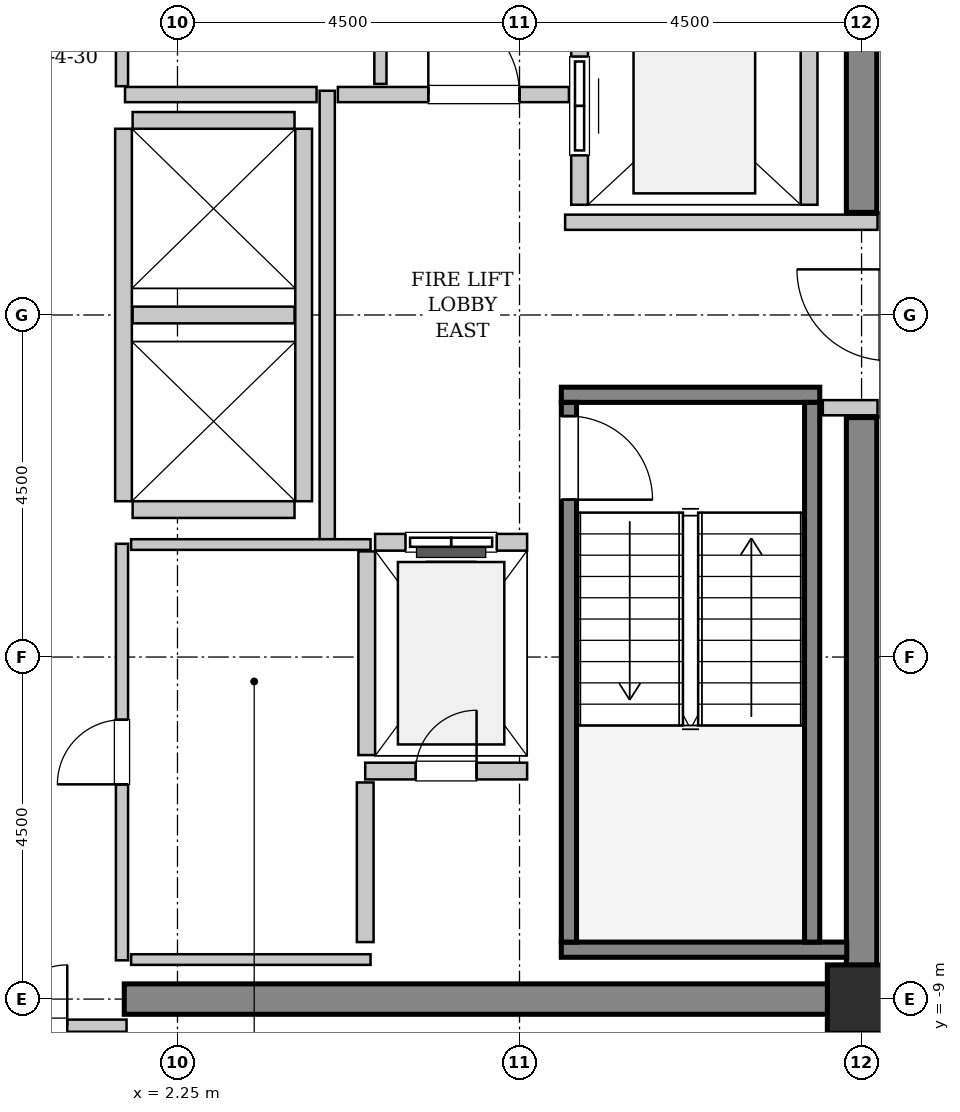
"""IFC4 building model, lengths in metres.
Left out: names, types, materials, properties, quantities, classifications, styles, units other than length and angle.
Written with IfcOpenShell. Run it as: python <this file> out.ifc"""

import sys

from ifc_helpers import new_model, si_unit, direction, frame, frame_2d, origin, origin_2d, place, context, subcontext, project, spatial, rectangle, extrude, source, transform, mapped, element, fill, save


model = new_model("IFC4")
c1 = context("Model", 3, precision=1e-05, world=origin(), true_north=direction((0.0, 1.0)))
c2 = subcontext(c1, "Body", "Model", "MODEL_VIEW")
j1 = project(units=[si_unit("LENGTHUNIT", "METRE"), si_unit("PLANEANGLEUNIT", "RADIAN")], contexts=[c1])
p1 = place(None, origin())
s1 = spatial("IfcSite", under=j1, at=p1, CompositionType="ELEMENT")
p2 = place(p1, origin())
s2 = spatial("IfcBuilding", under=s1, at=p2, CompositionType="ELEMENT")
p3 = place(p2, frame((0.0, 0.0, 337.6)))
s3 = spatial("IfcBuildingStorey", under=s2, at=p3, CompositionType="ELEMENT", Elevation=337.6)
m1 = source(origin(), c2, "Body", "SweptSolid", [
    extrude(rectangle(XDim=9.9, YDim=0.4, at=frame_2d((4.95, 0.0))), origin(), (0.0, 0.0, 1.0), 3.8),
])
p4 = place(p3, frame((1.55, -9.0, 0.0), z_axis=(0.0, 0.0, 1.0), x_axis=(1.0, 0.0, 0.0)))
e1 = element("IfcWall", 1, at=p4, inside=s3, PredefinedType="SHEAR", context=c2, shape_type="MappedRepresentation", body=[
    mapped(m1, transform((0.0, 0.0, 0.0), x_axis=(1.0, 0.0, 0.0), y_axis=(0.0, 1.0, 0.0), z_axis=(0.0, 0.0, 1.0), scale=1.0)),
])
m2 = source(origin(), c2, "Body", "SweptSolid", [
    extrude(rectangle(XDim=7.45, YDim=0.4, at=frame_2d((3.725, 0.0))), origin(), (0.0, 0.0, 1.0), 3.8),
])
for number, where, z_axis, x_axis in (
    (2, (11.25, -8.8, 0.0), (0.0, 0.0, 1.0), (0.0, 1.0, 0.0)),
    (3, (11.25, 1.35, 0.0), (0.0, 0.0, 1.0), (0.0, 1.0, 0.0)),
):
    element("IfcWall", number, at=place(p3, frame(where, z_axis=z_axis, x_axis=x_axis)), inside=s3, PredefinedType="SHEAR", context=c2, shape_type="MappedRepresentation", body=[
        mapped(m2, transform((0.0, 0.0, 0.0), x_axis=(1.0, 0.0, 0.0), y_axis=(0.0, 1.0, 0.0), z_axis=(0.0, 0.0, 1.0), scale=1.0)),
    ])
m3 = source(origin(), c2, "Body", "SweptSolid", [
    extrude(rectangle(XDim=0.9, YDim=0.9, at=origin_2d()), origin(), (0.0, 0.0, 1.0), 3.8),
])
p5 = place(p3, frame((11.25, -9.0, 0.0), z_axis=(0.0, 0.0, 1.0), x_axis=(1.0, 0.0, 0.0)))
e4 = element("IfcColumn", 4, at=p5, inside=s3, PredefinedType="COLUMN", context=c2, shape_type="MappedRepresentation", body=[
    mapped(m3, transform((0.0, 0.0, 0.0), x_axis=(1.0, 0.0, 0.0), y_axis=(0.0, 1.0, 0.0), z_axis=(0.0, 0.0, 1.0), scale=1.0)),
])
m4 = source(origin(), c2, "Body", "SweptSolid", [
    extrude(rectangle(XDim=3.4, YDim=0.2, at=frame_2d((1.7, 0.0))), origin(), (0.0, 0.0, 1.0), 3.8),
])
p6 = place(p3, frame((7.3, -1.05, 0.0), z_axis=(0.0, 0.0, 1.0), x_axis=(1.0, 0.0, 0.0)))
e5 = element("IfcWall", 5, at=p6, inside=s3, PredefinedType="SOLIDWALL", context=c2, shape_type="MappedRepresentation", body=[
    mapped(m4, transform((0.0, 0.0, 0.0), x_axis=(1.0, 0.0, 0.0), y_axis=(0.0, 1.0, 0.0), z_axis=(0.0, 0.0, 1.0), scale=1.0)),
])
m5 = source(origin(), c2, "Body", "SweptSolid", [
    extrude(rectangle(XDim=3.755, YDim=0.2, at=frame_2d((1.877, 0.0))), origin(), (0.0, 0.0, 1.0), 3.8),
])
p7 = place(p3, frame((7.3, -8.35, 0.0), z_axis=(0.0, 0.0, 1.0), x_axis=(1.0, 0.0, 0.0)))
e6 = element("IfcWall", 6, at=p7, inside=s3, PredefinedType="SOLIDWALL", context=c2, shape_type="MappedRepresentation", body=[
    mapped(m5, transform((0.0, 0.0, 0.0), x_axis=(1.0, 0.0, 0.0), y_axis=(0.0, 1.0, 0.0), z_axis=(0.0, 0.0, 1.0), scale=1.0)),
])
m6 = source(origin(), c2, "Body", "SweptSolid", [
    extrude(rectangle(XDim=7.1, YDim=0.2, at=frame_2d((3.55, 0.0))), origin(), (0.0, 0.0, 1.0), 3.8),
])
p8 = place(p3, frame((7.4, -1.15, 0.0), z_axis=(0.0, 0.0, 1.0), x_axis=(0.0, -1.0, 0.0)))
e7 = element("IfcWall", 7, at=p8, inside=s3, PredefinedType="SOLIDWALL", context=c2, shape_type="MappedRepresentation", body=[
    mapped(m6, transform((0.0, 0.0, 0.0), x_axis=(1.0, 0.0, 0.0), y_axis=(0.0, 1.0, 0.0), z_axis=(0.0, 0.0, 1.0), scale=1.0)),
])
p9 = place(p8, frame((0.18, 0.0, 0.0)))
e8 = element("IfcOpeningElement", 8, at=p9, cuts=e7, PredefinedType="OPENING", context=c2, shape_type="SweptSolid", body=[
    extrude(rectangle(XDim=1.1, YDim=2.15, at=frame_2d((0.55, 1.075))), frame((0.0, 0.11, 0.0), z_axis=(0.0, -1.0, 0.0), x_axis=(1.0, 0.0, 0.0)), (0.0, 0.0, 1.0), 0.22),
])
p10 = place(p3, frame((10.6, -1.15, 0.0), z_axis=(0.0, 0.0, 1.0), x_axis=(0.0, -1.0, 0.0)))
e9 = element("IfcWall", 9, at=p10, inside=s3, PredefinedType="SOLIDWALL", context=c2, shape_type="MappedRepresentation", body=[
    mapped(m6, transform((0.0, 0.0, 0.0), x_axis=(1.0, 0.0, 0.0), y_axis=(0.0, 1.0, 0.0), z_axis=(0.0, 0.0, 1.0), scale=1.0)),
])
m7 = source(origin(), c2, "Body", "SweptSolid", [
    extrude(rectangle(XDim=2.0, YDim=0.22, at=frame_2d((1.0, 0.0))), origin(), (0.0, 0.0, 1.0), 3.535),
])
p11 = place(p3, frame((6.85, -2.99, 0.0), z_axis=(0.0, 0.0, 1.0), x_axis=(-1.0, 0.0, 0.0)))
e10 = element("IfcWall", 10, at=p11, inside=s3, PredefinedType="SOLIDWALL", context=c2, shape_type="MappedRepresentation", body=[
    mapped(m7, transform((0.0, 0.0, 0.0), x_axis=(1.0, 0.0, 0.0), y_axis=(0.0, 1.0, 0.0), z_axis=(0.0, 0.0, 1.0), scale=1.0)),
])
p12 = place(p11, frame((0.4, 0.0, 0.0)))
e11 = element("IfcOpeningElement", 11, at=p12, cuts=e10, PredefinedType="OPENING", context=c2, shape_type="SweptSolid", body=[
    extrude(rectangle(XDim=1.2, YDim=2.2, at=frame_2d((0.6, 1.1))), frame((0.0, 0.12, 0.0), z_axis=(0.0, -1.0, 0.0), x_axis=(1.0, 0.0, 0.0)), (0.0, 0.0, 1.0), 0.24),
])
m8 = source(origin(), c2, "Body", "SweptSolid", [
    extrude(rectangle(XDim=2.68, YDim=0.22, at=frame_2d((1.34, 0.0))), origin(), (0.0, 0.0, 1.0), 3.535),
])
p13 = place(p3, frame((4.74, -3.11, 0.0), z_axis=(0.0, 0.0, 1.0), x_axis=(0.0, -1.0, 0.0)))
e12 = element("IfcWall", 12, at=p13, inside=s3, PredefinedType="SOLIDWALL", context=c2, shape_type="MappedRepresentation", body=[
    mapped(m8, transform((0.0, 0.0, 0.0), x_axis=(1.0, 0.0, 0.0), y_axis=(0.0, 1.0, 0.0), z_axis=(0.0, 0.0, 1.0), scale=1.0)),
])
m9 = source(origin(), c2, "Body", "SweptSolid", [
    extrude(rectangle(XDim=5.45, YDim=0.22, at=frame_2d((2.725, 0.0))), origin(), (0.0, 0.0, 1.0), 3.535),
])
p14 = place(p3, frame((7.54, 6.9, 0.0), z_axis=(0.0, 0.0, 1.0), x_axis=(0.0, -1.0, 0.0)))
e13 = element("IfcWall", 13, at=p14, inside=s3, PredefinedType="SOLIDWALL", context=c2, shape_type="MappedRepresentation", body=[
    mapped(m9, transform((0.0, 0.0, 0.0), x_axis=(1.0, 0.0, 0.0), y_axis=(0.0, 1.0, 0.0), z_axis=(0.0, 0.0, 1.0), scale=1.0)),
])
p15 = place(p14, frame((3.5, 0.0, 0.0)))
e14 = element("IfcOpeningElement", 14, at=p15, cuts=e13, PredefinedType="OPENING", context=c2, shape_type="SweptSolid", body=[
    extrude(rectangle(XDim=1.3, YDim=2.3, at=frame_2d((0.65, 1.15))), frame((0.0, 0.12, 0.0), z_axis=(0.0, -1.0, 0.0), x_axis=(1.0, 0.0, 0.0)), (0.0, 0.0, 1.0), 0.24),
])
p16 = place(p14, frame((0.65, 0.0, 0.0)))
e15 = element("IfcOpeningElement", 15, at=p16, cuts=e13, PredefinedType="OPENING", context=c2, shape_type="SweptSolid", body=[
    extrude(rectangle(XDim=1.3, YDim=2.3, at=frame_2d((0.65, 1.15))), frame((0.0, 0.12, 0.0), z_axis=(0.0, -1.0, 0.0), x_axis=(1.0, 0.0, 0.0)), (0.0, 0.0, 1.0), 0.24),
])
p17 = place(p3, frame((10.56, 1.45, 0.0), z_axis=(0.0, 0.0, 1.0), x_axis=(0.0, 1.0, 0.0)))
e16 = element("IfcWall", 16, at=p17, inside=s3, PredefinedType="SOLIDWALL", context=c2, shape_type="MappedRepresentation", body=[
    mapped(m9, transform((0.0, 0.0, 0.0), x_axis=(1.0, 0.0, 0.0), y_axis=(0.0, 1.0, 0.0), z_axis=(0.0, 0.0, 1.0), scale=1.0)),
])
m10 = source(origin(), c2, "Body", "SweptSolid", [
    extrude(rectangle(XDim=4.9, YDim=0.22, at=frame_2d((2.45, 0.0))), origin(), (0.0, 0.0, 1.0), 3.535),
])
for number, where, z_axis, x_axis in (
    (17, (1.54, 2.45, 0.0), (0.0, 0.0, 1.0), (0.0, -1.0, 0.0)),
    (18, (3.91, -2.45, 0.0), (0.0, 0.0, 1.0), (0.0, 1.0, 0.0)),
):
    element("IfcWall", number, at=place(p3, frame(where, z_axis=z_axis, x_axis=x_axis)), inside=s3, PredefinedType="SOLIDWALL", context=c2, shape_type="MappedRepresentation", body=[
        mapped(m10, transform((0.0, 0.0, 0.0), x_axis=(1.0, 0.0, 0.0), y_axis=(0.0, 1.0, 0.0), z_axis=(0.0, 0.0, 1.0), scale=1.0)),
    ])
m11 = source(origin(), c2, "Body", "SweptSolid", [
    extrude(rectangle(XDim=2.13, YDim=0.22, at=frame_2d((1.065, 0.0))), origin(), (0.0, 0.0, 1.0), 3.535),
])
for number, where, z_axis, x_axis in (
    (19, (1.66, -2.56, 0.0), (0.0, 0.0, 1.0), (1.0, 0.0, 0.0)),
    (20, (1.66, 0.0, 0.0), (0.0, 0.0, 1.0), (1.0, 0.0, 0.0)),
    (21, (3.79, 2.56, 0.0), (0.0, 0.0, 1.0), (-1.0, 0.0, 0.0)),
):
    element("IfcWall", number, at=place(p3, frame(where, z_axis=z_axis, x_axis=x_axis)), inside=s3, PredefinedType="SOLIDWALL", context=c2, shape_type="MappedRepresentation", body=[
        mapped(m11, transform((0.0, 0.0, 0.0), x_axis=(1.0, 0.0, 0.0), y_axis=(0.0, 1.0, 0.0), z_axis=(0.0, 0.0, 1.0), scale=1.0)),
    ])
p18 = place(p3, frame((4.72, -6.0, 0.0), z_axis=(0.0, 0.0, 1.0), x_axis=(1.0, 0.0, 0.0)))
e22 = element("IfcWall", 22, at=p18, inside=s3, PredefinedType="SOLIDWALL", context=c2, shape_type="MappedRepresentation", body=[
    mapped(m11, transform((0.0, 0.0, 0.0), x_axis=(1.0, 0.0, 0.0), y_axis=(0.0, 1.0, 0.0), z_axis=(0.0, 0.0, 1.0), scale=1.0)),
])
p19 = place(p18, frame((0.665, 0.0, 0.0)))
e23 = element("IfcOpeningElement", 23, at=p19, cuts=e22, PredefinedType="OPENING", context=c2, shape_type="SweptSolid", body=[
    extrude(rectangle(XDim=0.8, YDim=2.0, at=frame_2d((0.4, 1.0))), frame((0.0, 0.12, 0.0), z_axis=(0.0, -1.0, 0.0), x_axis=(1.0, 0.0, 0.0)), (0.0, 0.0, 1.0), 0.24),
])
m12 = source(origin(), c2, "Body", "SweptSolid", [
    extrude(rectangle(XDim=2.1, YDim=0.22, at=frame_2d((1.05, 0.0))), origin(), (0.0, 0.0, 1.0), 3.535),
])
p20 = place(p3, frame((4.72, -8.25, 0.0), z_axis=(0.0, 0.0, 1.0), x_axis=(0.0, 1.0, 0.0)))
e24 = element("IfcWall", 24, at=p20, inside=s3, PredefinedType="SOLIDWALL", context=c2, shape_type="MappedRepresentation", body=[
    mapped(m12, transform((0.0, 0.0, 0.0), x_axis=(1.0, 0.0, 0.0), y_axis=(0.0, 1.0, 0.0), z_axis=(0.0, 0.0, 1.0), scale=1.0)),
])
m13 = source(origin(), c2, "Body", "SweptSolid", [
    extrude(rectangle(XDim=5.9, YDim=0.2, at=frame_2d((2.95, 0.0))), origin(), (0.0, 0.0, 1.0), 3.535),
])
p21 = place(p3, frame((4.22, -2.95, 0.0), z_axis=(0.0, 0.0, 1.0), x_axis=(0.0, 1.0, 0.0)))
e25 = element("IfcWall", 25, at=p21, inside=s3, PredefinedType="PARTITIONING", context=c2, shape_type="MappedRepresentation", body=[
    mapped(m13, transform((0.0, 0.0, 0.0), x_axis=(1.0, 0.0, 0.0), y_axis=(0.0, 1.0, 0.0), z_axis=(0.0, 0.0, 1.0), scale=1.0)),
])
m14 = source(origin(), c2, "Body", "SweptSolid", [
    extrude(rectangle(XDim=2.52, YDim=0.2, at=frame_2d((1.26, 0.0))), origin(), (0.0, 0.0, 1.0), 3.535),
])
p22 = place(p3, frame((1.56, 2.9, 0.0), z_axis=(0.0, 0.0, 1.0), x_axis=(1.0, 0.0, 0.0)))
e26 = element("IfcWall", 26, at=p22, inside=s3, PredefinedType="PARTITIONING", context=c2, shape_type="MappedRepresentation", body=[
    mapped(m14, transform((0.0, 0.0, 0.0), x_axis=(1.0, 0.0, 0.0), y_axis=(0.0, 1.0, 0.0), z_axis=(0.0, 0.0, 1.0), scale=1.0)),
])
m15 = source(origin(), c2, "Body", "SweptSolid", [
    extrude(rectangle(XDim=3.04, YDim=0.2, at=frame_2d((1.52, 0.0))), origin(), (0.0, 0.0, 1.0), 3.535),
])
p23 = place(p3, frame((4.36, 2.9, 0.0), z_axis=(0.0, 0.0, 1.0), x_axis=(1.0, 0.0, 0.0)))
e27 = element("IfcWall", 27, at=p23, inside=s3, PredefinedType="PARTITIONING", context=c2, shape_type="MappedRepresentation", body=[
    mapped(m15, transform((0.0, 0.0, 0.0), x_axis=(1.0, 0.0, 0.0), y_axis=(0.0, 1.0, 0.0), z_axis=(0.0, 0.0, 1.0), scale=1.0)),
])
p24 = place(p23, frame((1.19, 0.0, 0.0)))
e28 = element("IfcOpeningElement", 28, at=p24, cuts=e27, PredefinedType="OPENING", context=c2, shape_type="SweptSolid", body=[
    extrude(rectangle(XDim=1.2, YDim=2.15, at=frame_2d((0.6, 1.075))), frame((0.0, 0.11, 0.0), z_axis=(0.0, -1.0, 0.0), x_axis=(1.0, 0.0, 0.0)), (0.0, 0.0, 1.0), 0.22),
])
m16 = source(origin(), c2, "Body", "SweptSolid", [
    extrude(rectangle(XDim=4.11, YDim=0.2, at=frame_2d((2.055, 0.0))), origin(), (0.0, 0.0, 1.0), 3.535),
])
p25 = place(p3, frame((7.35, 1.22, 0.0), z_axis=(0.0, 0.0, 1.0), x_axis=(1.0, 0.0, 0.0)))
e29 = element("IfcWall", 29, at=p25, inside=s3, PredefinedType="PARTITIONING", context=c2, shape_type="MappedRepresentation", body=[
    mapped(m16, transform((0.0, 0.0, 0.0), x_axis=(1.0, 0.0, 0.0), y_axis=(0.0, 1.0, 0.0), z_axis=(0.0, 0.0, 1.0), scale=1.0)),
])
m17 = source(origin(), c2, "Body", "SweptSolid", [
    extrude(rectangle(XDim=0.72, YDim=0.2, at=frame_2d((0.36, 0.0))), origin(), (0.0, 0.0, 1.0), 3.535),
])
p26 = place(p3, frame((10.74, -1.22, 0.0), z_axis=(0.0, 0.0, 1.0), x_axis=(1.0, 0.0, 0.0)))
e30 = element("IfcWall", 30, at=p26, inside=s3, PredefinedType="PARTITIONING", context=c2, shape_type="MappedRepresentation", body=[
    mapped(m17, transform((0.0, 0.0, 0.0), x_axis=(1.0, 0.0, 0.0), y_axis=(0.0, 1.0, 0.0), z_axis=(0.0, 0.0, 1.0), scale=1.0)),
])
m18 = source(origin(), c2, "Body", "SweptSolid", [
    extrude(rectangle(XDim=3.16, YDim=0.16, at=frame_2d((1.58, 0.0))), origin(), (0.0, 0.0, 1.0), 2.625),
])
p27 = place(p3, frame((-1.58, -9.35, 0.0), z_axis=(0.0, 0.0, 1.0), x_axis=(1.0, 0.0, 0.0)))
e31 = element("IfcWall", 31, at=p27, inside=s3, PredefinedType="PARTITIONING", context=c2, shape_type="MappedRepresentation", body=[
    mapped(m18, transform((0.0, 0.0, 0.0), x_axis=(1.0, 0.0, 0.0), y_axis=(0.0, 1.0, 0.0), z_axis=(0.0, 0.0, 1.0), scale=1.0)),
])
p28 = place(p27, frame((0.78, 0.0, 0.0)))
e32 = element("IfcOpeningElement", 32, at=p28, cuts=e31, PredefinedType="OPENING", context=c2, shape_type="SweptSolid", body=[
    extrude(rectangle(XDim=1.6, YDim=2.3, at=frame_2d((0.8, 1.15))), frame((0.0, 0.09, 0.0), z_axis=(0.0, -1.0, 0.0), x_axis=(1.0, 0.0, 0.0)), (0.0, 0.0, 1.0), 0.18),
])
m19 = source(origin(), c2, "Body", "SweptSolid", [
    extrude(rectangle(XDim=5.45, YDim=0.16, at=frame_2d((2.725, 0.0))), origin(), (0.0, 0.0, 1.0), 3.535),
])
p29 = place(p3, frame((4.92, 3.04, 0.0), z_axis=(0.0, 0.0, 1.0), x_axis=(0.0, 1.0, 0.0)))
e33 = element("IfcWall", 33, at=p29, inside=s3, PredefinedType="PARTITIONING", context=c2, shape_type="MappedRepresentation", body=[
    mapped(m19, transform((0.0, 0.0, 0.0), x_axis=(1.0, 0.0, 0.0), y_axis=(0.0, 1.0, 0.0), z_axis=(0.0, 0.0, 1.0), scale=1.0)),
])
m20 = source(origin(), c2, "Body", "SweptSolid", [
    extrude(rectangle(XDim=5.48, YDim=0.16, at=frame_2d((2.74, 0.0))), origin(), (0.0, 0.0, 1.0), 3.535),
])
p30 = place(p3, frame((1.52, 3.01, 0.0), z_axis=(0.0, 0.0, 1.0), x_axis=(0.0, 1.0, 0.0)))
e34 = element("IfcWall", 34, at=p30, inside=s3, PredefinedType="PARTITIONING", context=c2, shape_type="MappedRepresentation", body=[
    mapped(m20, transform((0.0, 0.0, 0.0), x_axis=(1.0, 0.0, 0.0), y_axis=(0.0, 1.0, 0.0), z_axis=(0.0, 0.0, 1.0), scale=1.0)),
])
p31 = place(p30, frame((2.315, 0.0, 0.0)))
e35 = element("IfcOpeningElement", 35, at=p31, cuts=e34, PredefinedType="OPENING", context=c2, shape_type="SweptSolid", body=[
    extrude(rectangle(XDim=0.85, YDim=2.1, at=frame_2d((0.425, 1.05))), frame((0.0, 0.09, 0.0), z_axis=(0.0, -1.0, 0.0), x_axis=(1.0, 0.0, 0.0)), (0.0, 0.0, 1.0), 0.18),
])
p32 = place(p3, frame((1.52, -8.49, 0.0), z_axis=(0.0, 0.0, 1.0), x_axis=(0.0, 1.0, 0.0)))
e36 = element("IfcWall", 36, at=p32, inside=s3, PredefinedType="PARTITIONING", context=c2, shape_type="MappedRepresentation", body=[
    mapped(m20, transform((0.0, 0.0, 0.0), x_axis=(1.0, 0.0, 0.0), y_axis=(0.0, 1.0, 0.0), z_axis=(0.0, 0.0, 1.0), scale=1.0)),
])
p33 = place(p32, frame((2.315, 0.0, 0.0)))
e37 = element("IfcOpeningElement", 37, at=p33, cuts=e36, PredefinedType="OPENING", context=c2, shape_type="SweptSolid", body=[
    extrude(rectangle(XDim=0.85, YDim=2.1, at=frame_2d((0.425, 1.05))), frame((0.0, 0.09, 0.0), z_axis=(0.0, -1.0, 0.0), x_axis=(1.0, 0.0, 0.0)), (0.0, 0.0, 1.0), 0.18),
])
m21 = source(origin(), c2, "Body", "SweptSolid", [
    extrude(rectangle(XDim=3.15, YDim=0.14, at=frame_2d((1.575, 0.0))), origin(), (0.0, 0.0, 1.0), 3.535),
])
for number, where, z_axis, x_axis in (
    (38, (1.64, -3.02, 0.0), (0.0, 0.0, 1.0), (1.0, 0.0, 0.0)),
    (39, (1.64, -8.48, 0.0), (0.0, 0.0, 1.0), (1.0, 0.0, 0.0)),
):
    element("IfcWall", number, at=place(p3, frame(where, z_axis=z_axis, x_axis=x_axis)), inside=s3, PredefinedType="PARTITIONING", context=c2, shape_type="MappedRepresentation", body=[
        mapped(m21, transform((0.0, 0.0, 0.0), x_axis=(1.0, 0.0, 0.0), y_axis=(0.0, 1.0, 0.0), z_axis=(0.0, 0.0, 1.0), scale=1.0)),
    ])
m22 = source(origin(), c2, "Body", "SweptSolid", [
    extrude(rectangle(XDim=1.1, YDim=2.15, at=frame_2d((0.55, 1.075))), frame((0.0, 0.025, 0.0), z_axis=(0.0, -1.0, 0.0), x_axis=(1.0, 0.0, 0.0)), (0.0, 0.0, 1.0), 0.05),
])
p34 = place(p9, origin())
e40 = element("IfcDoor", 40, at=p34, inside=s3, OperationType="SINGLE_SWING_RIGHT", PredefinedType="DOOR", context=c2, shape_type="MappedRepresentation", body=[
    mapped(m22, transform((0.0, 0.0, 0.0), x_axis=(1.0, 0.0, 0.0), y_axis=(0.0, 1.0, 0.0), z_axis=(0.0, 0.0, 1.0), scale=1.0)),
])
fill(e8, e40)
m23 = source(origin(), c2, "Body", "SweptSolid", [
    extrude(rectangle(XDim=1.2, YDim=2.2, at=frame_2d((0.6, 1.1))), frame((0.0, 0.025, 0.0), z_axis=(0.0, -1.0, 0.0), x_axis=(1.0, 0.0, 0.0)), (0.0, 0.0, 1.0), 0.05),
])
p35 = place(p12, origin())
e41 = element("IfcDoor", 41, at=p35, inside=s3, OperationType="SLIDING_TO_LEFT", PredefinedType="DOOR", context=c2, shape_type="MappedRepresentation", body=[
    mapped(m23, transform((0.0, 0.0, 0.0), x_axis=(1.0, 0.0, 0.0), y_axis=(0.0, 1.0, 0.0), z_axis=(0.0, 0.0, 1.0), scale=1.0)),
])
fill(e11, e41)
m24 = source(origin(), c2, "Body", "SweptSolid", [
    extrude(rectangle(XDim=1.3, YDim=2.3, at=frame_2d((0.65, 1.15))), frame((0.0, 0.025, 0.0), z_axis=(0.0, -1.0, 0.0), x_axis=(1.0, 0.0, 0.0)), (0.0, 0.0, 1.0), 0.05),
])
p36 = place(p15, origin())
e42 = element("IfcDoor", 42, at=p36, inside=s3, OperationType="SLIDING_TO_RIGHT", PredefinedType="DOOR", context=c2, shape_type="MappedRepresentation", body=[
    mapped(m24, transform((0.0, 0.0, 0.0), x_axis=(1.0, 0.0, 0.0), y_axis=(0.0, 1.0, 0.0), z_axis=(0.0, 0.0, 1.0), scale=1.0)),
])
fill(e14, e42)
m25 = source(origin(), c2, "Body", "SweptSolid", [
    extrude(rectangle(XDim=0.8, YDim=2.0, at=frame_2d((0.4, 1.0))), frame((0.0, 0.025, 0.0), z_axis=(0.0, -1.0, 0.0), x_axis=(1.0, 0.0, 0.0)), (0.0, 0.0, 1.0), 0.05),
])
p37 = place(p19, origin())
e43 = element("IfcDoor", 43, at=p37, inside=s3, OperationType="SINGLE_SWING_RIGHT", PredefinedType="TRAPDOOR", context=c2, shape_type="MappedRepresentation", body=[
    mapped(m25, transform((0.0, 0.0, 0.0), x_axis=(1.0, 0.0, 0.0), y_axis=(0.0, 1.0, 0.0), z_axis=(0.0, 0.0, 1.0), scale=1.0)),
])
fill(e23, e43)
m26 = source(origin(), c2, "Body", "SweptSolid", [
    extrude(rectangle(XDim=1.2, YDim=2.15, at=frame_2d((0.6, 1.075))), frame((0.0, 0.025, 0.0), z_axis=(0.0, -1.0, 0.0), x_axis=(1.0, 0.0, 0.0)), (0.0, 0.0, 1.0), 0.05),
])
p38 = place(p24, origin())
e44 = element("IfcDoor", 44, at=p38, inside=s3, OperationType="SINGLE_SWING_LEFT", PredefinedType="DOOR", context=c2, shape_type="MappedRepresentation", body=[
    mapped(m26, transform((0.0, 0.0, 0.0), x_axis=(1.0, 0.0, 0.0), y_axis=(0.0, 1.0, 0.0), z_axis=(0.0, 0.0, 1.0), scale=1.0)),
])
fill(e28, e44)
m27 = source(origin(), c2, "Body", "SweptSolid", [
    extrude(rectangle(XDim=1.6, YDim=2.3, at=frame_2d((0.8, 1.15))), frame((0.0, 0.025, 0.0), z_axis=(0.0, -1.0, 0.0), x_axis=(1.0, 0.0, 0.0)), (0.0, 0.0, 1.0), 0.05),
])
p39 = place(p28, origin())
e45 = element("IfcDoor", 45, at=p39, inside=s3, OperationType="DOUBLE_DOOR_SINGLE_SWING", PredefinedType="DOOR", context=c2, shape_type="MappedRepresentation", body=[
    mapped(m27, transform((0.0, 0.0, 0.0), x_axis=(1.0, 0.0, 0.0), y_axis=(0.0, 1.0, 0.0), z_axis=(0.0, 0.0, 1.0), scale=1.0)),
])
fill(e32, e45)
m28 = source(origin(), c2, "Body", "SweptSolid", [
    extrude(rectangle(XDim=0.85, YDim=2.1, at=frame_2d((0.425, 1.05))), frame((0.0, 0.025, 0.0), z_axis=(0.0, -1.0, 0.0), x_axis=(1.0, 0.0, 0.0)), (0.0, 0.0, 1.0), 0.05),
])
p40 = place(p33, origin())
e46 = element("IfcDoor", 46, at=p40, inside=s3, OperationType="SINGLE_SWING_LEFT", PredefinedType="DOOR", context=c2, shape_type="MappedRepresentation", body=[
    mapped(m28, transform((0.0, 0.0, 0.0), x_axis=(1.0, 0.0, 0.0), y_axis=(0.0, 1.0, 0.0), z_axis=(0.0, 0.0, 1.0), scale=1.0)),
])
fill(e37, e46)
save(model, sys.argv[1])
